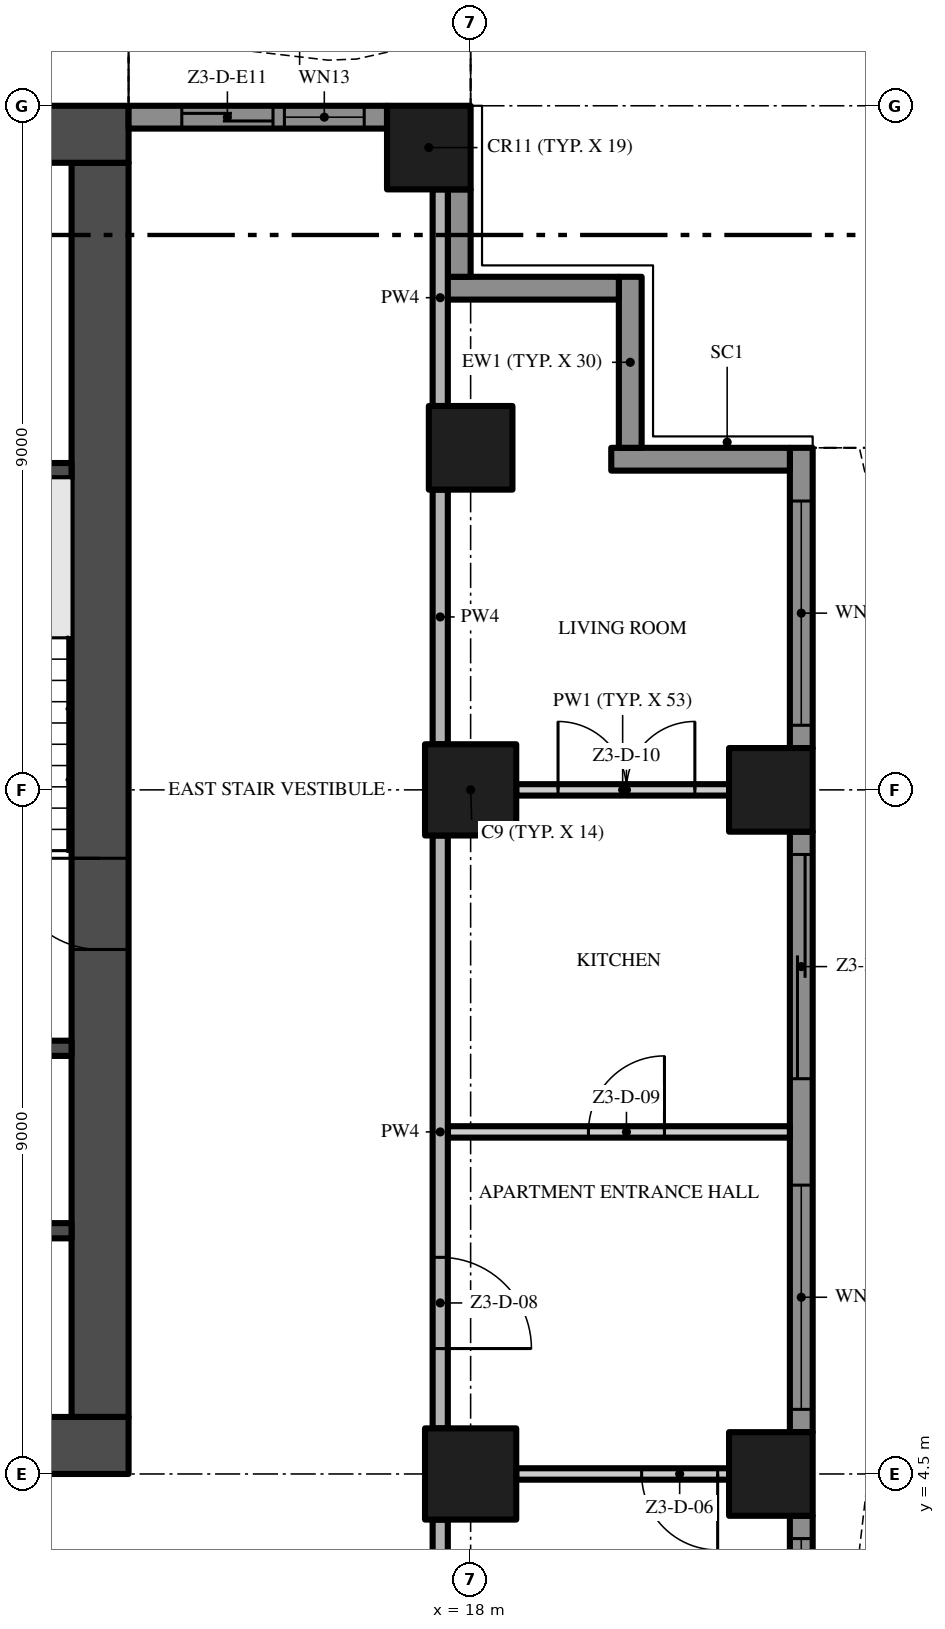
"""IFC4 building model, lengths in metres.
Left out: names, types, materials, properties, quantities, classifications, styles, units other than length and angle.
Written with IfcOpenShell. Run it as: python <this file> out.ifc"""

import sys

from ifc_helpers import new_model, si_unit, direction, frame, frame_2d, origin, origin_2d, place, context, subcontext, project, spatial, polyline, rectangle, outline, extrude, element, fill, save


model = new_model("IFC4")
c1 = context("Model", 3, precision=1e-05, world=origin(), true_north=direction((0.0, 1.0)))
c2 = subcontext(c1, "Body", "Model", "MODEL_VIEW")
j1 = project(units=[si_unit("LENGTHUNIT", "METRE"), si_unit("PLANEANGLEUNIT", "RADIAN")], contexts=[c1])
p1 = place(None, origin())
s1 = spatial("IfcSite", under=j1, at=p1, CompositionType="ELEMENT")
p2 = place(p1, origin())
s2 = spatial("IfcBuilding", under=s1, at=p2, CompositionType="ELEMENT")
p3 = place(p2, frame((0.0, 0.0, 163.0)))
s3 = spatial("IfcBuildingStorey", under=s2, at=p3, CompositionType="ELEMENT", Elevation=163.0)
p4 = place(p3, frame((-13.5, 4.875, -0.3), z_axis=(0.0, 0.0, 1.0), x_axis=(1.0, 0.0, 0.0)))
e1 = element("IfcWall", 1, at=p4, inside=s3, PredefinedType="SHEAR", context=c2, shape_type="SweptSolid", body=[
    extrude(rectangle(XDim=27.0, YDim=0.75, at=frame_2d((13.5, 0.0))), origin(), (0.0, 0.0, 1.0), 3.8),
])
p5 = place(p4, frame((12.0, 0.0, 0.3)))
e2 = element("IfcOpeningElement", 2, at=p5, cuts=e1, PredefinedType="OPENING", context=c2, shape_type="SweptSolid", body=[
    extrude(rectangle(XDim=3.0, YDim=2.4, at=frame_2d((1.5, 1.2))), frame((0.0, 0.385, 0.0), z_axis=(0.0, -1.0, 0.0), x_axis=(1.0, 0.0, 0.0)), (0.0, 0.0, 1.0), 0.77),
])
p6 = place(p4, frame((4.9, 0.0, 0.3)))
e3 = element("IfcOpeningElement", 3, at=p6, cuts=e1, PredefinedType="OPENING", context=c2, shape_type="SweptSolid", body=[
    extrude(rectangle(XDim=1.2, YDim=2.2, at=frame_2d((0.6, 1.1))), frame((0.0, 0.385, 0.0), z_axis=(0.0, -1.0, 0.0), x_axis=(1.0, 0.0, 0.0)), (0.0, 0.0, 1.0), 0.77),
])
p7 = place(p4, frame((20.75, 0.0, 0.3)))
e4 = element("IfcOpeningElement", 4, at=p7, cuts=e1, PredefinedType="OPENING", context=c2, shape_type="SweptSolid", body=[
    extrude(rectangle(XDim=1.5, YDim=2.2, at=frame_2d((0.75, 1.1))), frame((0.0, 0.385, 0.0), z_axis=(0.0, -1.0, 0.0), x_axis=(1.0, 0.0, 0.0)), (0.0, 0.0, 1.0), 0.77),
])
p8 = place(p4, frame((17.4, 0.0, 0.3)))
e5 = element("IfcOpeningElement", 5, at=p8, cuts=e1, PredefinedType="OPENING", context=c2, shape_type="SweptSolid", body=[
    extrude(rectangle(XDim=1.2, YDim=2.2, at=frame_2d((0.6, 1.1))), frame((0.0, 0.385, 0.0), z_axis=(0.0, -1.0, 0.0), x_axis=(1.0, 0.0, 0.0)), (0.0, 0.0, 1.0), 0.77),
])
p9 = place(p3, frame((13.125, 5.25, -0.3), z_axis=(0.0, 0.0, 1.0), x_axis=(0.0, 1.0, 0.0)))
e6 = element("IfcWall", 6, at=p9, inside=s3, PredefinedType="SHEAR", context=c2, shape_type="SweptSolid", body=[
    extrude(rectangle(XDim=16.5, YDim=0.75, at=frame_2d((8.25, 0.0))), origin(), (0.0, 0.0, 1.0), 3.8),
])
p10 = place(p9, frame((6.15, 0.0, 0.3)))
e7 = element("IfcOpeningElement", 7, at=p10, cuts=e6, PredefinedType="OPENING", context=c2, shape_type="SweptSolid", body=[
    extrude(rectangle(XDim=1.2, YDim=2.2, at=frame_2d((0.6, 1.1))), frame((0.0, 0.385, 0.0), z_axis=(0.0, -1.0, 0.0), x_axis=(1.0, 0.0, 0.0)), (0.0, 0.0, 1.0), 0.77),
])
p11 = place(p3, frame((13.5, 22.125, -0.3), z_axis=(0.0, 0.0, 1.0), x_axis=(-1.0, 0.0, 0.0)))
e8 = element("IfcWall", 8, at=p11, inside=s3, PredefinedType="SHEAR", context=c2, shape_type="SweptSolid", body=[
    extrude(rectangle(XDim=27.0, YDim=0.75, at=frame_2d((13.5, 0.0))), origin(), (0.0, 0.0, 1.0), 3.8),
])
p12 = place(p3, frame((18.0, 13.5, 0.0), z_axis=(0.0, 0.0, 1.0), x_axis=(1.0, 0.0, 0.0)))
e9 = element("IfcColumn", 9, at=p12, inside=s3, PredefinedType="COLUMN", context=c2, shape_type="SweptSolid", body=[
    extrude(rectangle(XDim=1.2, YDim=1.2, at=origin_2d()), origin(), (0.0, 0.0, 1.0), 3.5),
])
p13 = place(p3, frame((17.45, 21.95, 0.0), z_axis=(0.0, 0.0, 1.0), x_axis=(1.0, 0.0, 0.0)))
e10 = element("IfcColumn", 10, at=p13, inside=s3, PredefinedType="COLUMN", context=c2, shape_type="SweptSolid", body=[
    extrude(rectangle(XDim=1.1, YDim=1.1, at=origin_2d()), origin(), (0.0, 0.0, 1.0), 3.5),
])
p14 = place(p3, frame((18.0, 4.5, 0.0), z_axis=(0.0, 0.0, 1.0), x_axis=(1.0, 0.0, 0.0)))
e11 = element("IfcColumn", 11, at=p14, inside=s3, PredefinedType="COLUMN", context=c2, shape_type="SweptSolid", body=[
    extrude(rectangle(XDim=1.2, YDim=1.2, at=origin_2d()), origin(), (0.0, 0.0, 1.0), 3.5),
])
for number, where, z_axis, x_axis in (
    (12, (21.95, 13.5, 0.0), (0.0, 0.0, 1.0), (1.0, 0.0, 0.0)),
    (13, (18.0, 18.0, 0.0), (0.0, 0.0, 1.0), (1.0, 0.0, 0.0)),
    (14, (21.95, 4.5, 0.0), (0.0, 0.0, 1.0), (1.0, 0.0, 0.0)),
):
    element("IfcColumn", number, at=place(p3, frame(where, z_axis=z_axis, x_axis=x_axis)), inside=s3, PredefinedType="COLUMN", context=c2, shape_type="SweptSolid", body=[
        extrude(rectangle(XDim=1.1, YDim=1.1, at=origin_2d()), origin(), (0.0, 0.0, 1.0), 3.5),
    ])
p15 = place(p3, frame((22.35, 3.95, 0.0), z_axis=(0.0, 0.0, 1.0), x_axis=(0.0, -1.0, 0.0)))
e15 = element("IfcWall", 15, at=p15, inside=s3, PredefinedType="SOLIDWALL", context=c2, shape_type="SweptSolid", body=[
    extrude(rectangle(XDim=7.9, YDim=0.3, at=frame_2d((3.95, 0.0))), origin(), (0.0, 0.0, 1.0), 3.5),
])
p16 = place(p15, frame((4.65, 0.0, 0.0)))
e16 = element("IfcOpeningElement", 16, at=p16, cuts=e15, PredefinedType="OPENING", context=c2, shape_type="SweptSolid", body=[
    extrude(rectangle(XDim=2.95, YDim=2.4, at=frame_2d((1.475, 1.2))), frame((0.0, 0.16, 0.0), z_axis=(0.0, -1.0, 0.0), x_axis=(1.0, 0.0, 0.0)), (0.0, 0.0, 1.0), 0.32),
])
p17 = place(p15, frame((0.3, 0.0, 0.45)))
e17 = element("IfcOpeningElement", 17, at=p17, cuts=e15, PredefinedType="OPENING", context=c2, shape_type="SweptSolid", body=[
    extrude(rectangle(XDim=2.95, YDim=2.65, at=frame_2d((1.475, 1.325))), frame((0.0, 0.16, 0.0), z_axis=(0.0, -1.0, 0.0), x_axis=(1.0, 0.0, 0.0)), (0.0, 0.0, 1.0), 0.32),
])
p18 = place(p3, frame((22.35, 12.95, 0.0), z_axis=(0.0, 0.0, 1.0), x_axis=(0.0, -1.0, 0.0)))
e18 = element("IfcWall", 18, at=p18, inside=s3, PredefinedType="SOLIDWALL", context=c2, shape_type="SweptSolid", body=[
    extrude(rectangle(XDim=7.9, YDim=0.3, at=frame_2d((3.95, 0.0))), origin(), (0.0, 0.0, 1.0), 3.5),
])
p19 = place(p18, frame((4.65, 0.0, 0.45)))
e19 = element("IfcOpeningElement", 19, at=p19, cuts=e18, PredefinedType="OPENING", context=c2, shape_type="SweptSolid", body=[
    extrude(rectangle(XDim=2.95, YDim=2.65, at=frame_2d((1.475, 1.325))), frame((0.0, 0.16, 0.0), z_axis=(0.0, -1.0, 0.0), x_axis=(1.0, 0.0, 0.0)), (0.0, 0.0, 1.0), 0.32),
])
p20 = place(p18, frame((0.3, 0.0, 0.0)))
e20 = element("IfcOpeningElement", 20, at=p20, cuts=e18, PredefinedType="OPENING", context=c2, shape_type="SweptSolid", body=[
    extrude(rectangle(XDim=2.95, YDim=2.4, at=frame_2d((1.475, 1.2))), frame((0.0, 0.16, 0.0), z_axis=(0.0, -1.0, 0.0), x_axis=(1.0, 0.0, 0.0)), (0.0, 0.0, 1.0), 0.32),
])
p21 = place(p3, frame((22.35, 18.0, 0.0), z_axis=(0.0, 0.0, 1.0), x_axis=(0.0, -1.0, 0.0)))
e21 = element("IfcWall", 21, at=p21, inside=s3, PredefinedType="SOLIDWALL", context=c2, shape_type="SweptSolid", body=[
    extrude(rectangle(XDim=3.95, YDim=0.3, at=frame_2d((1.975, 0.0))), origin(), (0.0, 0.0, 1.0), 3.5),
])
p22 = place(p21, frame((0.7, 0.0, 0.45)))
e22 = element("IfcOpeningElement", 22, at=p22, cuts=e21, PredefinedType="OPENING", context=c2, shape_type="SweptSolid", body=[
    extrude(rectangle(XDim=2.95, YDim=2.65, at=frame_2d((1.475, 1.325))), frame((0.0, 0.16, 0.0), z_axis=(0.0, -1.0, 0.0), x_axis=(1.0, 0.0, 0.0)), (0.0, 0.0, 1.0), 0.32),
])
p23 = place(p3, frame((19.85, 17.85, 0.0), z_axis=(0.0, 0.0, 1.0), x_axis=(1.0, 0.0, 0.0)))
e23 = element("IfcWall", 23, at=p23, inside=s3, PredefinedType="SOLIDWALL", context=c2, shape_type="SweptSolid", body=[
    extrude(rectangle(XDim=2.35, YDim=0.3, at=frame_2d((1.175, 0.0))), origin(), (0.0, 0.0, 1.0), 3.5),
])
p24 = place(p3, frame((20.1, 20.25, 0.0), z_axis=(0.0, 0.0, 1.0), x_axis=(0.0, -1.0, 0.0)))
e24 = element("IfcWall", 24, at=p24, inside=s3, PredefinedType="SOLIDWALL", context=c2, shape_type="SweptSolid", body=[
    extrude(rectangle(XDim=2.25, YDim=0.3, at=frame_2d((1.125, 0.0))), origin(), (0.0, 0.0, 1.0), 3.5),
])
p25 = place(p3, frame((17.6, 20.1, 0.0), z_axis=(0.0, 0.0, 1.0), x_axis=(1.0, 0.0, 0.0)))
e25 = element("IfcWall", 25, at=p25, inside=s3, PredefinedType="SOLIDWALL", context=c2, shape_type="SweptSolid", body=[
    extrude(rectangle(XDim=2.35, YDim=0.3, at=frame_2d((1.175, 0.0))), origin(), (0.0, 0.0, 1.0), 3.5),
])
p26 = place(p3, frame((17.85, 21.4, 0.0), z_axis=(0.0, 0.0, 1.0), x_axis=(0.0, -1.0, 0.0)))
e26 = element("IfcWall", 26, at=p26, inside=s3, PredefinedType="SOLIDWALL", context=c2, shape_type="SweptSolid", body=[
    extrude(rectangle(XDim=1.15, YDim=0.3, at=frame_2d((0.575, 0.0))), origin(), (0.0, 0.0, 1.0), 3.5),
])
p27 = place(p3, frame((13.5, 22.35, 0.0), z_axis=(0.0, 0.0, 1.0), x_axis=(1.0, 0.0, 0.0)))
e27 = element("IfcWall", 27, at=p27, inside=s3, PredefinedType="SOLIDWALL", context=c2, shape_type="SweptSolid", body=[
    extrude(rectangle(XDim=3.4, YDim=0.3, at=frame_2d((1.7, 0.0))), origin(), (0.0, 0.0, 1.0), 3.5),
])
p28 = place(p27, frame((2.05, 0.0, 0.45)))
e28 = element("IfcOpeningElement", 28, at=p28, cuts=e27, PredefinedType="OPENING", context=c2, shape_type="SweptSolid", body=[
    extrude(rectangle(XDim=1.05, YDim=2.65, at=frame_2d((0.525, 1.325))), frame((0.0, 0.16, 0.0), z_axis=(0.0, -1.0, 0.0), x_axis=(1.0, 0.0, 0.0)), (0.0, 0.0, 1.0), 0.32),
])
p29 = place(p27, frame((0.7, 0.0, 0.0)))
e29 = element("IfcOpeningElement", 29, at=p29, cuts=e27, PredefinedType="OPENING", context=c2, shape_type="SweptSolid", body=[
    extrude(rectangle(XDim=1.2, YDim=2.4, at=frame_2d((0.6, 1.2))), frame((0.0, 0.16, 0.0), z_axis=(0.0, -1.0, 0.0), x_axis=(1.0, 0.0, 0.0)), (0.0, 0.0, 1.0), 0.32),
])
p30 = place(p3, origin())
e30 = element("IfcWall", 30, at=p30, inside=s3, PredefinedType="USERDEFINED", context=c2, shape_type="SweptSolid", body=[
    extrude(outline(polyline([(23.451, -13.5), (23.115, -12.0), (23.1, -11.625), (23.231, -10.5), (23.755, -9.0), (24.488, -7.5), (25.149, -6.0), (25.485, -4.5), (25.5, -4.125), (25.369, -3.0), (24.845, -1.5), (24.112, 0.0), (23.451, 1.5), (23.115, 3.0), (23.1, 3.375), (23.231, 4.5), (23.755, 6.0), (24.488, 7.5), (25.149, 9.0), (25.485, 10.5), (25.5, 10.875), (25.369, 12.0), (24.845, 13.5), (24.112, 15.0), (23.451, 16.5), (23.115, 18.0), (22.871, 17.945), (23.213, 16.421), (23.885, 14.895), (24.614, 13.404), (25.124, 11.944), (25.249, 10.865), (25.236, 10.533), (24.91, 9.079), (24.261, 7.605), (23.524, 6.096), (22.986, 4.556), (22.849, 3.385), (22.866, 2.967), (23.213, 1.421), (23.885, -0.105), (24.614, -1.596), (25.124, -3.056), (25.249, -4.135), (25.236, -4.467), (24.91, -5.921), (24.261, -7.395), (23.524, -8.904), (22.986, -10.444), (22.849, -11.615), (22.866, -12.033), (23.208, -13.555), (23.451, -13.5)])), origin(), (0.0, 0.0, 1.0), 0.9),
])
p31 = place(p3, origin())
e31 = element("IfcWall", 31, at=p31, inside=s3, PredefinedType="USERDEFINED", context=c2, shape_type="SweptSolid", body=[
    extrude(outline(polyline([(18.0, 23.451), (16.5, 23.115), (16.125, 23.1), (15.0, 23.231), (13.5, 23.755), (13.417, 23.519), (14.944, 22.986), (16.115, 22.849), (16.533, 22.866), (18.055, 23.208), (18.0, 23.451)])), origin(), (0.0, 0.0, 1.0), 0.9),
])
for number, where, z_axis, x_axis in (
    (32, (9.65, 7.7, 0.0), (0.0, 0.0, 1.0), (1.0, 0.0, 0.0)),
    (33, (9.65, 10.1, 0.0), (0.0, 0.0, 1.0), (1.0, 0.0, 0.0)),
    (34, (9.65, 17.7, 0.0), (0.0, 0.0, 1.0), (1.0, 0.0, 0.0)),
):
    element("IfcWall", number, at=place(p3, frame(where, z_axis=z_axis, x_axis=x_axis)), inside=s3, PredefinedType="SHEAR", context=c2, shape_type="SweptSolid", body=[
        extrude(rectangle(XDim=3.1, YDim=0.2, at=frame_2d((1.55, 0.0))), origin(), (0.0, 0.0, 1.0), 3.5),
    ])
p32 = place(p3, frame((21.4, 4.5, 0.0), z_axis=(0.0, 0.0, 1.0), x_axis=(-1.0, 0.0, 0.0)))
e35 = element("IfcWall", 35, at=p32, inside=s3, PredefinedType="PARTITIONING", context=c2, shape_type="SweptSolid", body=[
    extrude(rectangle(XDim=2.8, YDim=0.15, at=frame_2d((1.4, 0.0))), origin(), (0.0, 0.0, 1.0), 3.5),
])
p33 = place(p32, frame((0.15, 0.0, 0.0)))
e36 = element("IfcOpeningElement", 36, at=p33, cuts=e35, PredefinedType="OPENING", context=c2, shape_type="SweptSolid", body=[
    extrude(rectangle(XDim=1.0, YDim=2.4, at=frame_2d((0.5, 1.2))), frame((0.0, 0.085, 0.0), z_axis=(0.0, -1.0, 0.0), x_axis=(1.0, 0.0, 0.0)), (0.0, 0.0, 1.0), 0.17),
])
p34 = place(p3, frame((17.7, 9.0, 0.0), z_axis=(0.0, 0.0, 1.0), x_axis=(1.0, 0.0, 0.0)))
e37 = element("IfcWall", 37, at=p34, inside=s3, PredefinedType="PARTITIONING", context=c2, shape_type="SweptSolid", body=[
    extrude(rectangle(XDim=4.5, YDim=0.15, at=frame_2d((2.25, 0.0))), origin(), (0.0, 0.0, 1.0), 3.5),
])
p35 = place(p34, frame((1.85, 0.0, 0.0)))
e38 = element("IfcOpeningElement", 38, at=p35, cuts=e37, PredefinedType="OPENING", context=c2, shape_type="SweptSolid", body=[
    extrude(rectangle(XDim=1.0, YDim=2.4, at=frame_2d((0.5, 1.2))), frame((0.0, 0.085, 0.0), z_axis=(0.0, -1.0, 0.0), x_axis=(1.0, 0.0, 0.0)), (0.0, 0.0, 1.0), 0.17),
])
p36 = place(p3, frame((18.6, 13.5, 0.0), z_axis=(0.0, 0.0, 1.0), x_axis=(1.0, 0.0, 0.0)))
e39 = element("IfcWall", 39, at=p36, inside=s3, PredefinedType="PARTITIONING", context=c2, shape_type="SweptSolid", body=[
    extrude(rectangle(XDim=2.8, YDim=0.15, at=frame_2d((1.4, 0.0))), origin(), (0.0, 0.0, 1.0), 3.5),
])
p37 = place(p36, frame((0.55, 0.0, 0.0)))
e40 = element("IfcOpeningElement", 40, at=p37, cuts=e39, PredefinedType="OPENING", context=c2, shape_type="SweptSolid", body=[
    extrude(rectangle(XDim=1.8, YDim=2.4, at=frame_2d((0.9, 1.2))), frame((0.0, 0.085, 0.0), z_axis=(0.0, -1.0, 0.0), x_axis=(1.0, 0.0, 0.0)), (0.0, 0.0, 1.0), 0.17),
])
p38 = place(p3, frame((17.6, -0.2, 0.0), z_axis=(0.0, 0.0, 1.0), x_axis=(0.0, 1.0, 0.0)))
e41 = element("IfcWall", 41, at=p38, inside=s3, PredefinedType="PARTITIONING", context=c2, shape_type="SweptSolid", body=[
    extrude(rectangle(XDim=4.1, YDim=0.2, at=frame_2d((2.05, 0.0))), origin(), (0.0, 0.0, 1.0), 3.5),
])
p39 = place(p3, frame((17.6, 12.9, 0.0), z_axis=(0.0, 0.0, 1.0), x_axis=(0.0, -1.0, 0.0)))
e42 = element("IfcWall", 42, at=p39, inside=s3, PredefinedType="PARTITIONING", context=c2, shape_type="SweptSolid", body=[
    extrude(rectangle(XDim=7.8, YDim=0.2, at=frame_2d((3.9, 0.0))), origin(), (0.0, 0.0, 1.0), 3.5),
])
p40 = place(p39, frame((5.55, 0.0, 0.0)))
e43 = element("IfcOpeningElement", 43, at=p40, cuts=e42, PredefinedType="OPENING", context=c2, shape_type="SweptSolid", body=[
    extrude(rectangle(XDim=1.2, YDim=2.4, at=frame_2d((0.6, 1.2))), frame((0.0, 0.11, 0.0), z_axis=(0.0, -1.0, 0.0), x_axis=(1.0, 0.0, 0.0)), (0.0, 0.0, 1.0), 0.22),
])
p41 = place(p3, frame((17.6, 14.1, 0.0), z_axis=(0.0, 0.0, 1.0), x_axis=(0.0, 1.0, 0.0)))
e44 = element("IfcWall", 44, at=p41, inside=s3, PredefinedType="PARTITIONING", context=c2, shape_type="SweptSolid", body=[
    extrude(rectangle(XDim=3.35, YDim=0.2, at=frame_2d((1.675, 0.0))), origin(), (0.0, 0.0, 1.0), 3.5),
])
p42 = place(p3, frame((17.6, 18.55, 0.0), z_axis=(0.0, 0.0, 1.0), x_axis=(0.0, 1.0, 0.0)))
e45 = element("IfcWall", 45, at=p42, inside=s3, PredefinedType="PARTITIONING", context=c2, shape_type="SweptSolid", body=[
    extrude(rectangle(XDim=2.85, YDim=0.2, at=frame_2d((1.425, 0.0))), origin(), (0.0, 0.0, 1.0), 3.5),
])
p43 = place(p17, origin())
e46 = element("IfcWindow", 46, at=p43, inside=s3, PartitioningType="SINGLE_PANEL", PredefinedType="WINDOW", context=c2, shape_type="SweptSolid", body=[
    extrude(rectangle(XDim=2.95, YDim=2.65, at=frame_2d((1.475, 1.325))), frame((0.0, 0.03, 0.0), z_axis=(0.0, -1.0, 0.0), x_axis=(1.0, 0.0, 0.0)), (0.0, 0.0, 1.0), 0.06),
])
fill(e17, e46)
p44 = place(p19, origin())
e47 = element("IfcWindow", 47, at=p44, inside=s3, PartitioningType="SINGLE_PANEL", PredefinedType="WINDOW", context=c2, shape_type="SweptSolid", body=[
    extrude(rectangle(XDim=2.95, YDim=2.65, at=frame_2d((1.475, 1.325))), frame((0.0, 0.03, 0.0), z_axis=(0.0, -1.0, 0.0), x_axis=(1.0, 0.0, 0.0)), (0.0, 0.0, 1.0), 0.06),
])
fill(e19, e47)
p45 = place(p20, origin())
e48 = element("IfcDoor", 48, at=p45, inside=s3, OperationType="SINGLE_SWING_LEFT", PredefinedType="DOOR", context=c2, shape_type="SweptSolid", body=[
    extrude(rectangle(XDim=2.95, YDim=2.4, at=frame_2d((1.475, 1.2))), frame((0.0, 0.025, 0.0), z_axis=(0.0, -1.0, 0.0), x_axis=(1.0, 0.0, 0.0)), (0.0, 0.0, 1.0), 0.05),
])
fill(e20, e48)
p46 = place(p22, origin())
e49 = element("IfcWindow", 49, at=p46, inside=s3, PartitioningType="SINGLE_PANEL", PredefinedType="WINDOW", context=c2, shape_type="SweptSolid", body=[
    extrude(rectangle(XDim=2.95, YDim=2.65, at=frame_2d((1.475, 1.325))), frame((0.0, 0.03, 0.0), z_axis=(0.0, -1.0, 0.0), x_axis=(1.0, 0.0, 0.0)), (0.0, 0.0, 1.0), 0.06),
])
fill(e22, e49)
p47 = place(p28, origin())
e50 = element("IfcWindow", 50, at=p47, inside=s3, PartitioningType="SINGLE_PANEL", PredefinedType="WINDOW", context=c2, shape_type="SweptSolid", body=[
    extrude(rectangle(XDim=1.05, YDim=2.65, at=frame_2d((0.525, 1.325))), frame((0.0, 0.03, 0.0), z_axis=(0.0, -1.0, 0.0), x_axis=(1.0, 0.0, 0.0)), (0.0, 0.0, 1.0), 0.06),
])
fill(e28, e50)
p48 = place(p29, origin())
e51 = element("IfcDoor", 51, at=p48, inside=s3, OperationType="SINGLE_SWING_LEFT", PredefinedType="DOOR", context=c2, shape_type="SweptSolid", body=[
    extrude(rectangle(XDim=1.2, YDim=2.4, at=frame_2d((0.6, 1.2))), frame((0.0, 0.025, 0.0), z_axis=(0.0, -1.0, 0.0), x_axis=(1.0, 0.0, 0.0)), (0.0, 0.0, 1.0), 0.05),
])
fill(e29, e51)
p49 = place(p10, frame((1.2, 0.0, 0.0), z_axis=(0.0, 0.0, 1.0), x_axis=(-1.0, 0.0, 0.0)))
e52 = element("IfcDoor", 52, at=p49, inside=s3, OperationType="SINGLE_SWING_LEFT", PredefinedType="DOOR", context=c2, shape_type="SweptSolid", body=[
    extrude(rectangle(XDim=1.2, YDim=2.2, at=frame_2d((0.6, 1.1))), frame((0.0, 0.025, 0.0), z_axis=(0.0, -1.0, 0.0), x_axis=(1.0, 0.0, 0.0)), (0.0, 0.0, 1.0), 0.05),
])
fill(e7, e52)
p50 = place(p33, origin())
e53 = element("IfcDoor", 53, at=p50, inside=s3, OperationType="SINGLE_SWING_LEFT", PredefinedType="DOOR", context=c2, shape_type="SweptSolid", body=[
    extrude(rectangle(XDim=1.0, YDim=2.4, at=frame_2d((0.5, 1.2))), frame((0.0, 0.025, 0.0), z_axis=(0.0, -1.0, 0.0), x_axis=(1.0, 0.0, 0.0)), (0.0, 0.0, 1.0), 0.05),
])
fill(e36, e53)
p51 = place(p40, origin())
e54 = element("IfcDoor", 54, at=p51, inside=s3, OperationType="SINGLE_SWING_RIGHT", PredefinedType="DOOR", context=c2, shape_type="SweptSolid", body=[
    extrude(rectangle(XDim=1.2, YDim=2.4, at=frame_2d((0.6, 1.2))), frame((0.0, 0.025, 0.0), z_axis=(0.0, -1.0, 0.0), x_axis=(1.0, 0.0, 0.0)), (0.0, 0.0, 1.0), 0.05),
])
fill(e43, e54)
p52 = place(p35, origin())
e55 = element("IfcDoor", 55, at=p52, inside=s3, OperationType="SINGLE_SWING_RIGHT", PredefinedType="DOOR", context=c2, shape_type="SweptSolid", body=[
    extrude(rectangle(XDim=1.0, YDim=2.4, at=frame_2d((0.5, 1.2))), frame((0.0, 0.025, 0.0), z_axis=(0.0, -1.0, 0.0), x_axis=(1.0, 0.0, 0.0)), (0.0, 0.0, 1.0), 0.05),
])
fill(e38, e55)
p53 = place(p37, origin())
e56 = element("IfcDoor", 56, at=p53, inside=s3, OperationType="DOUBLE_DOOR_SINGLE_SWING", PredefinedType="DOOR", context=c2, shape_type="SweptSolid", body=[
    extrude(rectangle(XDim=1.8, YDim=2.4, at=frame_2d((0.9, 1.2))), frame((0.0, 0.025, 0.0), z_axis=(0.0, -1.0, 0.0), x_axis=(1.0, 0.0, 0.0)), (0.0, 0.0, 1.0), 0.05),
])
fill(e40, e56)
save(model, sys.argv[1])
